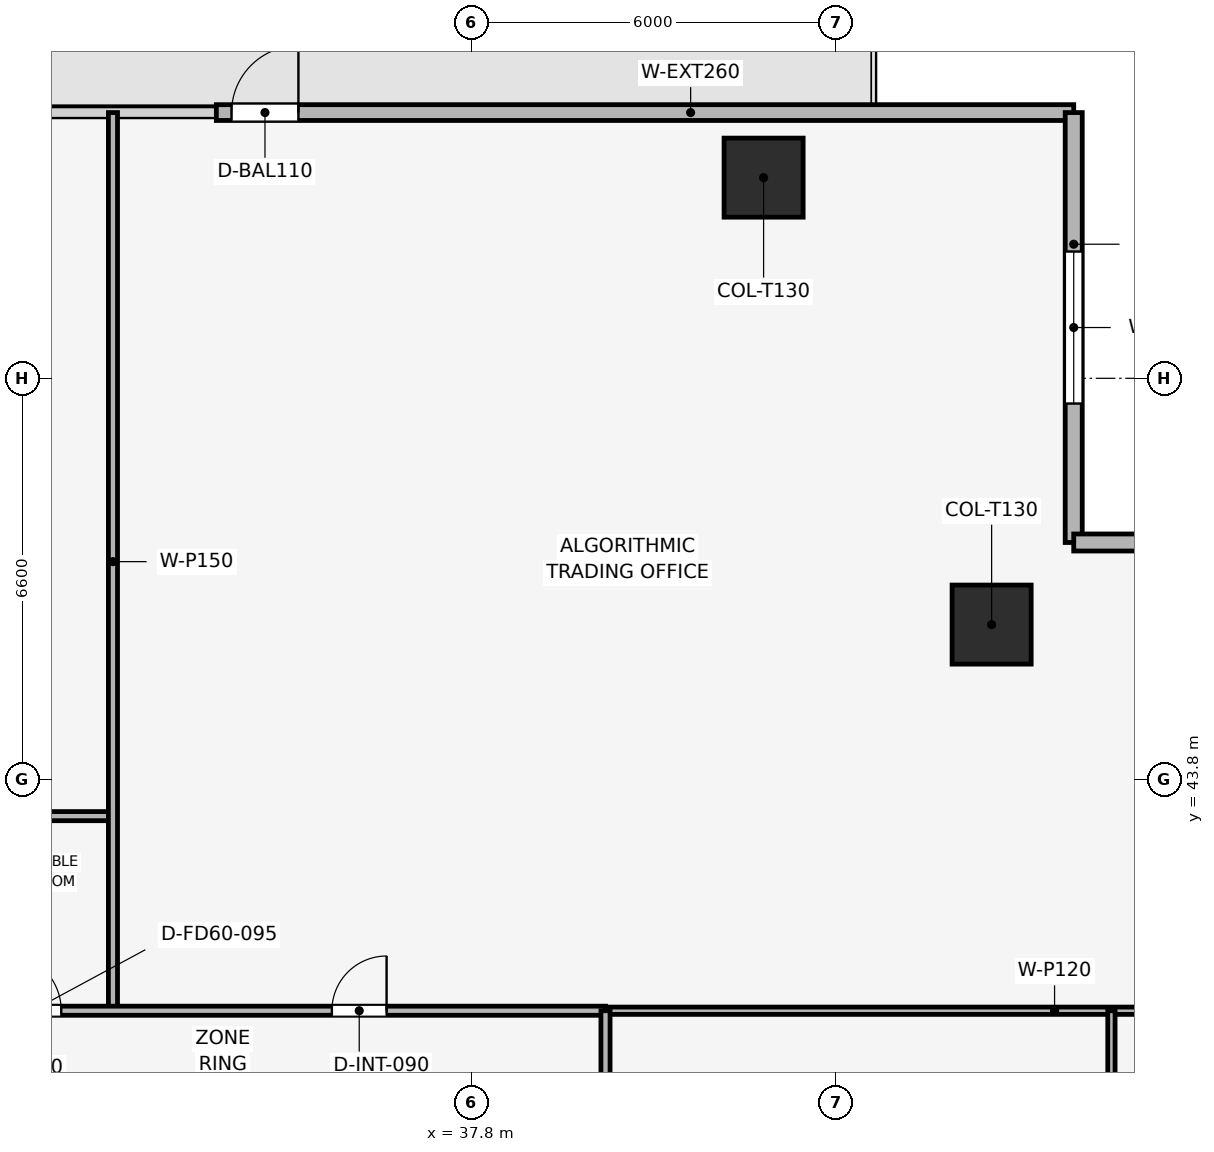
"""IFC4 building model, lengths in metres.
Left out: names, types, materials, properties, quantities, classifications, styles, units other than length and angle.
Written with IfcOpenShell. Run it as: python <this file> out.ifc"""

import sys

from ifc_helpers import new_model, si_unit, direction, frame, frame_2d, origin, origin_2d, place, context, subcontext, project, spatial, rectangle, extrude, element, fill, save


model = new_model("IFC4")
c1 = context("Model", 3, precision=1e-05, world=origin(), true_north=direction((0.0, 1.0)))
c2 = subcontext(c1, "Body", "Model", "MODEL_VIEW")
j1 = project(units=[si_unit("LENGTHUNIT", "METRE"), si_unit("PLANEANGLEUNIT", "RADIAN")], contexts=[c1])
p1 = place(None, origin())
s1 = spatial("IfcSite", under=j1, at=p1, CompositionType="ELEMENT")
p2 = place(p1, origin())
s2 = spatial("IfcBuilding", under=s1, at=p2, CompositionType="ELEMENT")
p3 = place(p2, frame((0.0, 0.0, 125.1)))
s3 = spatial("IfcBuildingStorey", under=s2, at=p3, CompositionType="ELEMENT", Elevation=125.1)
for number, where, z_axis, x_axis in (
    (1, (42.6, 53.7, 0.003), (0.0, 0.0, 1.0), (1.0, 0.0, 0.0)),
    (2, (46.35, 46.35, 0.003), (0.0, 0.0, 1.0), (1.0, 0.0, 0.0)),
):
    element("IfcColumn", number, at=place(p3, frame(where, z_axis=z_axis, x_axis=x_axis)), inside=s3, PredefinedType="COLUMN", context=c2, shape_type="SweptSolid", body=[
        extrude(rectangle(XDim=1.3, YDim=1.3, at=origin_2d()), origin(), (0.0, 0.0, 1.0), 3.644),
    ])
p4 = place(p3, frame((33.6, 54.77, 0.0), z_axis=(0.0, 0.0, 1.0), x_axis=(1.0, 0.0, 0.0)))
e3 = element("IfcWall", 3, at=p4, inside=s3, PredefinedType="SOLIDWALL", context=c2, shape_type="SweptSolid", body=[
    extrude(rectangle(XDim=14.1, YDim=0.26, at=frame_2d((7.05, 0.0))), origin(), (0.0, 0.0, 1.0), 3.65),
])
p5 = place(p4, frame((0.25, 0.0, 0.0)))
e4 = element("IfcOpeningElement", 4, at=p5, cuts=e3, PredefinedType="OPENING", context=c2, shape_type="SweptSolid", body=[
    extrude(rectangle(XDim=1.1, YDim=2.2, at=frame_2d((0.55, 1.1))), frame((0.0, 0.14, 0.0), z_axis=(0.0, -1.0, 0.0), x_axis=(1.0, 0.0, 0.0)), (0.0, 0.0, 1.0), 0.28),
])
p6 = place(p3, frame((47.7, 54.77, 0.0), z_axis=(0.0, 0.0, 1.0), x_axis=(0.0, -1.0, 0.0)))
e5 = element("IfcWall", 5, at=p6, inside=s3, PredefinedType="SOLIDWALL", context=c2, shape_type="SweptSolid", body=[
    extrude(rectangle(XDim=7.07, YDim=0.28, at=frame_2d((3.535, 0.0))), origin(), (0.0, 0.0, 1.0), 3.65),
])
p7 = place(p6, frame((2.285, 0.0, 0.9)))
e6 = element("IfcOpeningElement", 6, at=p7, cuts=e5, PredefinedType="OPENING", context=c2, shape_type="SweptSolid", body=[
    extrude(rectangle(XDim=2.5, YDim=1.9, at=frame_2d((1.25, 0.95))), frame((0.0, 0.15, 0.0), z_axis=(0.0, -1.0, 0.0), x_axis=(1.0, 0.0, 0.0)), (0.0, 0.0, 1.0), 0.3),
])
p8 = place(p3, frame((47.7, 47.7, 0.0), z_axis=(0.0, 0.0, 1.0), x_axis=(1.0, 0.0, 0.0)))
e7 = element("IfcWall", 7, at=p8, inside=s3, PredefinedType="SOLIDWALL", context=c2, shape_type="SweptSolid", body=[
    extrude(rectangle(XDim=7.07, YDim=0.28, at=frame_2d((3.535, 0.0))), origin(), (0.0, 0.0, 1.0), 3.65),
])
p9 = place(p8, frame((2.285, 0.0, 0.9)))
e8 = element("IfcOpeningElement", 8, at=p9, cuts=e7, PredefinedType="OPENING", context=c2, shape_type="SweptSolid", body=[
    extrude(rectangle(XDim=2.5, YDim=1.9, at=frame_2d((1.25, 0.95))), frame((0.0, 0.15, 0.0), z_axis=(0.0, -1.0, 0.0), x_axis=(1.0, 0.0, 0.0)), (0.0, 0.0, 1.0), 0.3),
])
p10 = place(p3, frame((23.5, 43.2, 0.0), z_axis=(0.0, 0.0, 1.0), x_axis=(1.0, 0.0, 0.0)))
e9 = element("IfcWall", 9, at=p10, inside=s3, PredefinedType="PARTITIONING", context=c2, shape_type="SweptSolid", body=[
    extrude(rectangle(XDim=8.4, YDim=0.15, at=frame_2d((4.2, 0.0))), origin(), (0.0, 0.0, 1.0), 3.185),
])
p11 = place(p3, frame((31.9, 40.0, 0.0), z_axis=(0.0, 0.0, 1.0), x_axis=(0.0, 1.0, 0.0)))
e10 = element("IfcWall", 10, at=p11, inside=s3, PredefinedType="PARTITIONING", context=c2, shape_type="SweptSolid", body=[
    extrude(rectangle(XDim=14.77, YDim=0.15, at=frame_2d((7.385, 0.0))), origin(), (0.0, 0.0, 1.0), 3.035),
])
p12 = place(p3, frame((40.0, 40.0, 0.0), z_axis=(0.0, 0.0, 1.0), x_axis=(1.0, 0.0, 0.0)))
e11 = element("IfcWall", 11, at=p12, inside=s3, PredefinedType="PARTITIONING", context=c2, shape_type="SweptSolid", body=[
    extrude(rectangle(XDim=14.77, YDim=0.12, at=frame_2d((7.385, 0.0))), origin(), (0.0, 0.0, 1.0), 3.035),
])
p13 = place(p3, frame((48.32, 17.6, 0.0), z_axis=(0.0, 0.0, 1.0), x_axis=(0.0, 1.0, 0.0)))
e12 = element("IfcWall", 12, at=p13, inside=s3, PredefinedType="PARTITIONING", context=c2, shape_type="SweptSolid", body=[
    extrude(rectangle(XDim=22.4, YDim=0.12, at=frame_2d((11.2, 0.0))), origin(), (0.0, 0.0, 1.0), 3.185),
])
p14 = place(p13, frame((17.783, 0.0, 0.0)))
e13 = element("IfcOpeningElement", 13, at=p14, cuts=e12, PredefinedType="OPENING", context=c2, shape_type="SweptSolid", body=[
    extrude(rectangle(XDim=0.9, YDim=2.1, at=frame_2d((0.45, 1.05))), frame((0.0, 0.07, 0.0), z_axis=(0.0, -1.0, 0.0), x_axis=(1.0, 0.0, 0.0)), (0.0, 0.0, 1.0), 0.14),
])
p15 = place(p3, frame((17.6, 40.0, 0.0), z_axis=(0.0, 0.0, 1.0), x_axis=(1.0, 0.0, 0.0)))
e14 = element("IfcWall", 14, at=p15, inside=s3, PredefinedType="PARTITIONING", context=c2, shape_type="SweptSolid", body=[
    extrude(rectangle(XDim=22.4, YDim=0.15, at=frame_2d((11.2, 0.0))), origin(), (0.0, 0.0, 1.0), 3.185),
])
p16 = place(p15, frame((2.5, 0.0, 0.0)))
e15 = element("IfcOpeningElement", 15, at=p16, cuts=e14, PredefinedType="OPENING", context=c2, shape_type="SweptSolid", body=[
    extrude(rectangle(XDim=0.9, YDim=2.1, at=frame_2d((0.45, 1.05))), frame((0.0, 0.085, 0.0), z_axis=(0.0, -1.0, 0.0), x_axis=(1.0, 0.0, 0.0)), (0.0, 0.0, 1.0), 0.17),
])
p17 = place(p15, frame((6.85, 0.0, 0.0)))
e16 = element("IfcOpeningElement", 16, at=p17, cuts=e14, PredefinedType="OPENING", context=c2, shape_type="SweptSolid", body=[
    extrude(rectangle(XDim=0.9, YDim=2.1, at=frame_2d((0.45, 1.05))), frame((0.0, 0.085, 0.0), z_axis=(0.0, -1.0, 0.0), x_axis=(1.0, 0.0, 0.0)), (0.0, 0.0, 1.0), 0.17),
])
p18 = place(p15, frame((9.75, 0.0, 0.0)))
e17 = element("IfcOpeningElement", 17, at=p18, cuts=e14, PredefinedType="OPENING", context=c2, shape_type="SweptSolid", body=[
    extrude(rectangle(XDim=0.9, YDim=2.1, at=frame_2d((0.45, 1.05))), frame((0.0, 0.085, 0.0), z_axis=(0.0, -1.0, 0.0), x_axis=(1.0, 0.0, 0.0)), (0.0, 0.0, 1.0), 0.17),
])
p19 = place(p15, frame((12.5, 0.0, 0.0)))
e18 = element("IfcOpeningElement", 18, at=p19, cuts=e14, PredefinedType="OPENING", context=c2, shape_type="SweptSolid", body=[
    extrude(rectangle(XDim=0.95, YDim=2.1, at=frame_2d((0.475, 1.05))), frame((0.0, 0.085, 0.0), z_axis=(0.0, -1.0, 0.0), x_axis=(1.0, 0.0, 0.0)), (0.0, 0.0, 1.0), 0.17),
])
p20 = place(p15, frame((17.9, 0.0, 0.0)))
e19 = element("IfcOpeningElement", 19, at=p20, cuts=e14, PredefinedType="OPENING", context=c2, shape_type="SweptSolid", body=[
    extrude(rectangle(XDim=0.9, YDim=2.1, at=frame_2d((0.45, 1.05))), frame((0.0, 0.085, 0.0), z_axis=(0.0, -1.0, 0.0), x_axis=(1.0, 0.0, 0.0)), (0.0, 0.0, 1.0), 0.17),
])
p21 = place(p3, frame((40.0, 17.6, 0.0), z_axis=(0.0, 0.0, 1.0), x_axis=(0.0, 1.0, 0.0)))
e20 = element("IfcWall", 20, at=p21, inside=s3, PredefinedType="PARTITIONING", context=c2, shape_type="SweptSolid", body=[
    extrude(rectangle(XDim=22.4, YDim=0.15, at=frame_2d((11.2, 0.0))), origin(), (0.0, 0.0, 1.0), 3.185),
])
p22 = place(p21, frame((10.75, 0.0, 0.0)))
e21 = element("IfcOpeningElement", 21, at=p22, cuts=e20, PredefinedType="OPENING", context=c2, shape_type="SweptSolid", body=[
    extrude(rectangle(XDim=0.9, YDim=2.1, at=frame_2d((0.45, 1.05))), frame((0.0, 0.085, 0.0), z_axis=(0.0, -1.0, 0.0), x_axis=(1.0, 0.0, 0.0)), (0.0, 0.0, 1.0), 0.17),
])
p23 = place(p5, origin())
e22 = element("IfcDoor", 22, at=p23, inside=s3, OperationType="SINGLE_SWING_RIGHT", PredefinedType="DOOR", context=c2, shape_type="SweptSolid", body=[
    extrude(rectangle(XDim=1.1, YDim=2.2, at=frame_2d((0.55, 1.1))), frame((0.0, 0.025, 0.0), z_axis=(0.0, -1.0, 0.0), x_axis=(1.0, 0.0, 0.0)), (0.0, 0.0, 1.0), 0.05),
])
fill(e4, e22)
p24 = place(p7, origin())
e23 = element("IfcWindow", 23, at=p24, inside=s3, PartitioningType="SINGLE_PANEL", PredefinedType="WINDOW", context=c2, shape_type="SweptSolid", body=[
    extrude(rectangle(XDim=2.5, YDim=1.9, at=frame_2d((1.25, 0.95))), frame((0.0, 0.03, 0.0), z_axis=(0.0, -1.0, 0.0), x_axis=(1.0, 0.0, 0.0)), (0.0, 0.0, 1.0), 0.06),
])
fill(e6, e23)
p25 = place(p19, origin())
e24 = element("IfcDoor", 24, at=p25, inside=s3, OperationType="SINGLE_SWING_LEFT", PredefinedType="DOOR", context=c2, shape_type="SweptSolid", body=[
    extrude(rectangle(XDim=0.95, YDim=2.1, at=frame_2d((0.475, 1.05))), frame((0.0, 0.025, 0.0), z_axis=(0.0, -1.0, 0.0), x_axis=(1.0, 0.0, 0.0)), (0.0, 0.0, 1.0), 0.05),
])
fill(e18, e24)
p26 = place(p20, origin())
e25 = element("IfcDoor", 25, at=p26, inside=s3, OperationType="SINGLE_SWING_RIGHT", PredefinedType="DOOR", context=c2, shape_type="SweptSolid", body=[
    extrude(rectangle(XDim=0.9, YDim=2.1, at=frame_2d((0.45, 1.05))), frame((0.0, 0.025, 0.0), z_axis=(0.0, -1.0, 0.0), x_axis=(1.0, 0.0, 0.0)), (0.0, 0.0, 1.0), 0.05),
])
fill(e19, e25)
save(model, sys.argv[1])
